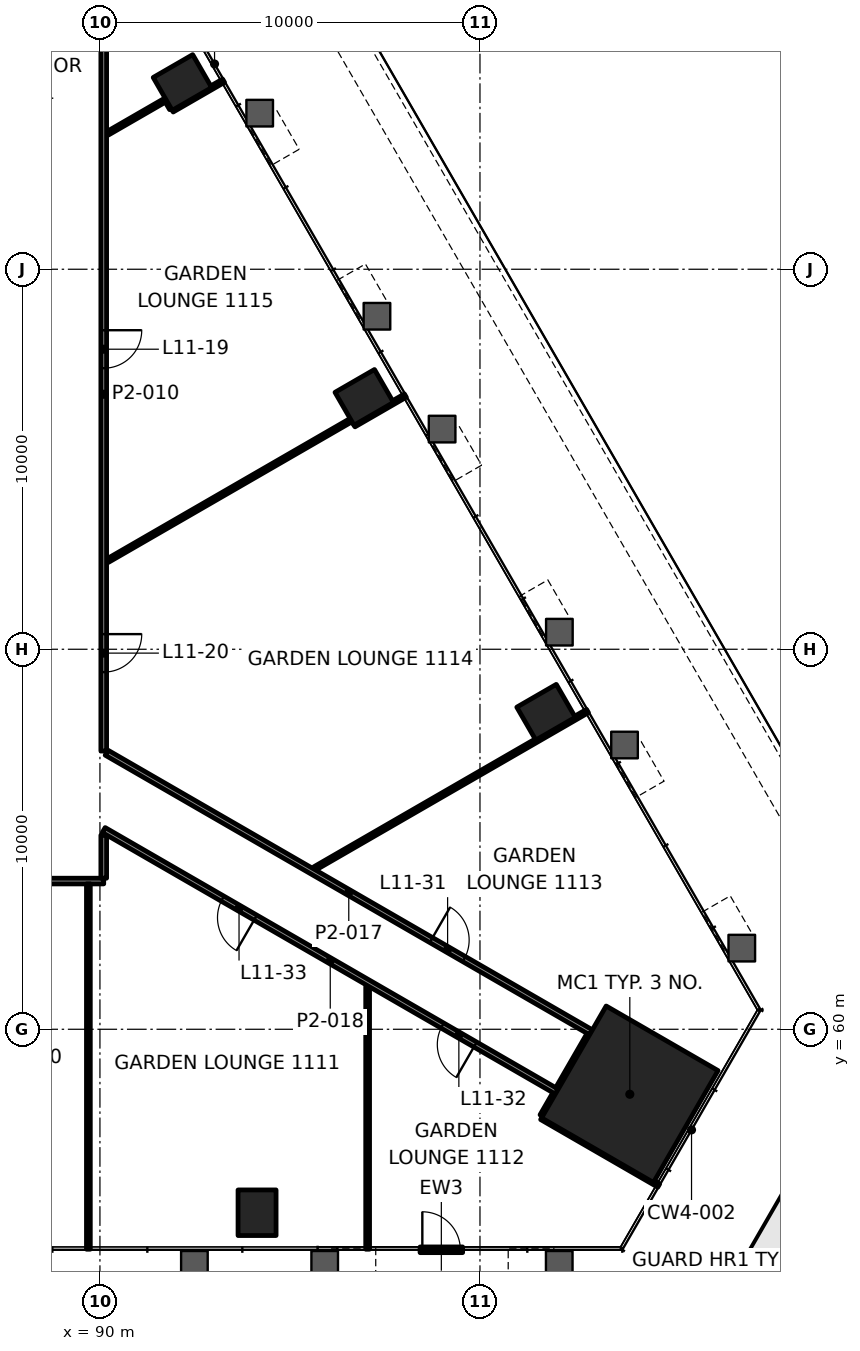
"""IFC4 building model, lengths in metres.
Left out: names, types, materials, properties, quantities, classifications, styles, units other than length and angle.
Written with IfcOpenShell. Run it as: python <this file> out.ifc"""

import sys

from ifc_helpers import new_model, si_unit, direction, frame, frame_2d, origin, origin_2d, place, context, subcontext, project, spatial, rectangle, extrude, element, fill, save


model = new_model("IFC4")
c1 = context("Model", 3, precision=1e-05, world=origin(), true_north=direction((0.0, 1.0)))
c2 = subcontext(c1, "Body", "Model", "MODEL_VIEW")
j1 = project(units=[si_unit("LENGTHUNIT", "METRE"), si_unit("PLANEANGLEUNIT", "RADIAN")], contexts=[c1])
p1 = place(None, origin())
s1 = spatial("IfcSite", under=j1, at=p1, CompositionType="ELEMENT")
p2 = place(p1, origin())
s2 = spatial("IfcBuilding", under=s1, at=p2, CompositionType="ELEMENT")
p3 = place(p2, frame((0.0, 0.0, 52.6)))
s3 = spatial("IfcBuildingStorey", under=s2, at=p3, CompositionType="ELEMENT", Elevation=52.6)
p4 = place(p3, frame((103.943, 58.29, 0.0), z_axis=(0.0, 0.0, 1.0), x_axis=(0.5, 0.866025403784, 0.0)))
e1 = element("IfcColumn", 1, at=p4, inside=s3, PredefinedType="COLUMN", context=c2, shape_type="SweptSolid", body=[
    extrude(rectangle(XDim=3.4, YDim=3.4, at=origin_2d()), origin(), (0.0, 0.0, 1.0), 4.2),
])
for number, where, z_axis, x_axis in (
    (2, (94.135, 55.172, -0.0), (0.0, 0.0, 1.0), (1.0, 0.0, 0.0)),
    (3, (101.739, 68.343, -0.0), (0.0, 0.0, 1.0), (-0.5, 0.866, 0.0)),
    (4, (96.955, 76.628, -0.0), (0.0, 0.0, 1.0), (-0.5, 0.866, 0.0)),
    (5, (92.171, 84.914, -0.0), (0.0, 0.0, 1.0), (-0.5, 0.866, 0.0)),
):
    element("IfcColumn", number, at=place(p3, frame(where, z_axis=z_axis, x_axis=x_axis)), inside=s3, PredefinedType="COLUMN", context=c2, shape_type="SweptSolid", body=[
        extrude(rectangle(XDim=1.0, YDim=1.2, at=origin_2d()), origin(), (0.0, 0.0, 1.0), 4.2),
    ])
p5 = place(p3, frame((90.1, 63.9, 0.0), z_axis=(0.0, 0.0, 1.0), x_axis=(-1.0, 0.0, 0.0)))
e6 = element("IfcWall", 6, at=p5, inside=s3, PredefinedType="PARTITIONING", context=c2, shape_type="SweptSolid", body=[
    extrude(rectangle(XDim=30.2, YDim=0.15, at=frame_2d((15.1, 0.0))), origin(), (0.0, 0.0, 1.0), 3.4),
])
p6 = place(p5, frame((3.578, 0.0, 0.0)))
e7 = element("IfcOpeningElement", 7, at=p6, cuts=e6, PredefinedType="OPENING", context=c2, shape_type="SweptSolid", body=[
    extrude(rectangle(XDim=1.0, YDim=2.1, at=frame_2d((0.5, 1.05))), frame((0.0, 0.085, 0.0), z_axis=(0.0, -1.0, 0.0), x_axis=(1.0, 0.0, 0.0)), (0.0, 0.0, 1.0), 0.17),
])
p7 = place(p5, frame((10.926, 0.0, 0.0)))
e8 = element("IfcOpeningElement", 8, at=p7, cuts=e6, PredefinedType="OPENING", context=c2, shape_type="SweptSolid", body=[
    extrude(rectangle(XDim=1.0, YDim=2.1, at=frame_2d((0.5, 1.05))), frame((0.0, 0.085, 0.0), z_axis=(0.0, -1.0, 0.0), x_axis=(1.0, 0.0, 0.0)), (0.0, 0.0, 1.0), 0.17),
])
p8 = place(p5, frame((22.048, 0.0, 0.0)))
e9 = element("IfcOpeningElement", 9, at=p8, cuts=e6, PredefinedType="OPENING", context=c2, shape_type="SweptSolid", body=[
    extrude(rectangle(XDim=1.0, YDim=2.1, at=frame_2d((0.5, 1.05))), frame((0.0, 0.085, 0.0), z_axis=(0.0, -1.0, 0.0), x_axis=(1.0, 0.0, 0.0)), (0.0, 0.0, 1.0), 0.17),
])
p9 = place(p3, frame((95.653, 64.232, 0.0), z_axis=(0.0, 0.0, 1.0), x_axis=(0.866031516549, 0.499989412232, 0.0)))
e10 = element("IfcWall", 10, at=p9, inside=s3, PredefinedType="PARTITIONING", context=c2, shape_type="SweptSolid", body=[
    extrude(rectangle(XDim=8.286, YDim=0.1, at=frame_2d((4.143, 0.0))), origin(), (0.0, 0.0, 1.0), 3.4),
])
p10 = place(p3, frame((96.686, 75.896, 0.0), z_axis=(0.0, 0.0, 1.0), x_axis=(0.866018739521, 0.500011542666, 0.0)))
e11 = element("IfcWall", 11, at=p10, inside=s3, PredefinedType="PARTITIONING", context=c2, shape_type="SweptSolid", body=[
    extrude(rectangle(XDim=1.56, YDim=0.1, at=frame_2d((0.78, 0.0))), origin(), (0.0, 0.0, 1.0), 3.165),
])
p11 = place(p3, frame((90.201, 72.331, 0.0), z_axis=(0.0, 0.0, 1.0), x_axis=(0.866022913937, 0.500004312517, 0.0)))
e12 = element("IfcWall", 12, at=p11, inside=s3, PredefinedType="PARTITIONING", context=c2, shape_type="SweptSolid", body=[
    extrude(rectangle(XDim=7.398, YDim=0.1, at=frame_2d((3.699, 0.0))), origin(), (0.0, 0.0, 1.0), 3.4),
])
p12 = place(p3, frame((91.902, 84.181, 0.0), z_axis=(0.0, 0.0, 1.0), x_axis=(0.866018739521, 0.500011542666, 0.0)))
e13 = element("IfcWall", 13, at=p12, inside=s3, PredefinedType="PARTITIONING", context=c2, shape_type="SweptSolid", body=[
    extrude(rectangle(XDim=1.56, YDim=0.1, at=frame_2d((0.78, 0.0))), origin(), (0.0, 0.0, 1.0), 3.165),
])
p13 = place(p3, frame((90.201, 83.577, 0.0), z_axis=(0.0, 0.0, 1.0), x_axis=(0.866016025414, 0.500016243463, 0.0)))
e14 = element("IfcWall", 14, at=p13, inside=s3, PredefinedType="PARTITIONING", context=c2, shape_type="SweptSolid", body=[
    extrude(rectangle(XDim=1.774, YDim=0.1, at=frame_2d((0.887, 0.0))), origin(), (0.0, 0.0, 1.0), 3.4),
])
p14 = place(p3, frame((101.646, 57.711, 0.0), z_axis=(0.0, 0.0, 1.0), x_axis=(0.499837337514, 0.866119296648, 0.0)))
e15 = element("IfcWall", 15, at=p14, inside=s3, PredefinedType="PARTITIONING", context=c2, shape_type="SweptSolid", body=[
    extrude(rectangle(XDim=0.675, YDim=0.15, at=frame_2d((0.337, 0.0))), origin(), (0.0, 0.0, 1.0), 3.4),
])
p15 = place(p3, frame((97.044, 54.212, 0.0), z_axis=(0.0, 0.0, 1.0), x_axis=(0.0, 1.0, 0.0)))
e16 = element("IfcWall", 16, at=p15, inside=s3, PredefinedType="PARTITIONING", context=c2, shape_type="SweptSolid", body=[
    extrude(rectangle(XDim=6.905, YDim=0.1, at=frame_2d((3.453, 0.0))), origin(), (0.0, 0.0, 1.0), 3.4),
])
p16 = place(p3, frame((90.1, 63.976, 0.0), z_axis=(0.0, 0.0, 1.0), x_axis=(0.0, 1.0, 0.0)))
e17 = element("IfcWall", 17, at=p16, inside=s3, PredefinedType="PARTITIONING", context=c2, shape_type="SweptSolid", body=[
    extrude(rectangle(XDim=1.131, YDim=0.15, at=frame_2d((0.565, 0.0))), origin(), (0.0, 0.0, 1.0), 3.247),
])
p17 = place(p3, frame((90.1, 86.1, 0.0), z_axis=(0.0, 0.0, 1.0), x_axis=(0.0, -1.0, 0.0)))
e18 = element("IfcWall", 18, at=p17, inside=s3, PredefinedType="PARTITIONING", context=c2, shape_type="SweptSolid", body=[
    extrude(rectangle(XDim=18.778, YDim=0.15, at=frame_2d((9.389, 0.0))), origin(), (0.0, 0.0, 1.0), 3.4),
])
p18 = place(p17, frame((7.704, 0.0, 0.0)))
e19 = element("IfcOpeningElement", 19, at=p18, cuts=e18, PredefinedType="OPENING", context=c2, shape_type="SweptSolid", body=[
    extrude(rectangle(XDim=1.0, YDim=2.1, at=frame_2d((0.5, 1.05))), frame((0.0, 0.085, 0.0), z_axis=(0.0, -1.0, 0.0), x_axis=(1.0, 0.0, 0.0)), (0.0, 0.0, 1.0), 0.17),
])
p19 = place(p17, frame((15.701, 0.0, 0.0)))
e20 = element("IfcOpeningElement", 20, at=p19, cuts=e18, PredefinedType="OPENING", context=c2, shape_type="SweptSolid", body=[
    extrude(rectangle(XDim=1.0, YDim=2.1, at=frame_2d((0.5, 1.05))), frame((0.0, 0.085, 0.0), z_axis=(0.0, -1.0, 0.0), x_axis=(1.0, 0.0, 0.0)), (0.0, 0.0, 1.0), 0.17),
])
p20 = place(p3, frame((89.696, 54.212, 0.0), z_axis=(0.0, 0.0, 1.0), x_axis=(0.0, 1.0, 0.0)))
e21 = element("IfcWall", 21, at=p20, inside=s3, PredefinedType="PARTITIONING", context=c2, shape_type="SweptSolid", body=[
    extrude(rectangle(XDim=9.613, YDim=0.1, at=frame_2d((4.806, 0.0))), origin(), (0.0, 0.0, 1.0), 3.165),
])
p21 = place(p3, frame((91.877, 84.225, 0.0), z_axis=(0.0, 0.0, 1.0), x_axis=(-0.500313526201, 0.865844313662, 0.0)))
e22 = element("IfcWall", 22, at=p21, inside=s3, PredefinedType="PARTITIONING", context=c2, shape_type="SweptSolid", body=[
    extrude(rectangle(XDim=0.226, YDim=0.1, at=frame_2d((0.113, 0.0))), origin(), (0.0, 0.0, 1.0), 3.4),
])
p22 = place(p3, frame((90.175, 67.278, 0.0), z_axis=(0.0, 0.0, 1.0), x_axis=(0.866025356753, -0.50000008146, 0.0)))
e23 = element("IfcWall", 23, at=p22, inside=s3, PredefinedType="PARTITIONING", context=c2, shape_type="SweptSolid", body=[
    extrude(rectangle(XDim=14.717, YDim=0.15, at=frame_2d((7.358, 0.0))), origin(), (0.0, 0.0, 1.0), 3.4),
])
p23 = place(p22, frame((9.861, 0.0, 0.0)))
e24 = element("IfcOpeningElement", 24, at=p23, cuts=e23, PredefinedType="OPENING", context=c2, shape_type="SweptSolid", body=[
    extrude(rectangle(XDim=1.0, YDim=2.1, at=frame_2d((0.5, 1.05))), frame((0.0, 0.085, 0.0), z_axis=(0.0, -1.0, 0.0), x_axis=(1.0, 0.0, 0.0)), (0.0, 0.0, 1.0), 0.17),
])
p24 = place(p3, frame((102.021, 58.361, 0.0), z_axis=(0.0, 0.0, 1.0), x_axis=(-0.866027566471, 0.499996254098, 0.0)))
e25 = element("IfcWall", 25, at=p24, inside=s3, PredefinedType="PARTITIONING", context=c2, shape_type="SweptSolid", body=[
    extrude(rectangle(XDim=13.765, YDim=0.15, at=frame_2d((6.882, 0.0))), origin(), (0.0, 0.0, 1.0), 3.247),
])
p25 = place(p24, frame((2.475, 0.0, 0.0)))
e26 = element("IfcOpeningElement", 26, at=p25, cuts=e25, PredefinedType="OPENING", context=c2, shape_type="SweptSolid", body=[
    extrude(rectangle(XDim=1.0, YDim=2.1, at=frame_2d((0.5, 1.05))), frame((0.0, 0.085, 0.0), z_axis=(0.0, -1.0, 0.0), x_axis=(1.0, 0.0, 0.0)), (0.0, 0.0, 1.0), 0.17),
])
p26 = place(p24, frame((9.154, 0.0, 0.0)))
e27 = element("IfcOpeningElement", 27, at=p26, cuts=e25, PredefinedType="OPENING", context=c2, shape_type="SweptSolid", body=[
    extrude(rectangle(XDim=1.0, YDim=2.1, at=frame_2d((0.5, 1.05))), frame((0.0, 0.085, 0.0), z_axis=(0.0, -1.0, 0.0), x_axis=(1.0, 0.0, 0.0)), (0.0, 0.0, 1.0), 0.17),
])
p27 = place(p3, frame((104.704, 55.888, 0.0), z_axis=(0.0, 0.0, 1.0), x_axis=(-0.866014251095, 0.500019316528, 0.0)))
e28 = element("IfcWall", 28, at=p27, inside=s3, PredefinedType="PARTITIONING", context=c2, shape_type="SweptSolid", body=[
    extrude(rectangle(XDim=3.559, YDim=0.1, at=frame_2d((1.78, 0.0))), origin(), (0.0, 0.0, 1.0), 3.4),
])
p28 = place(p3, frame((102.058, 58.426, 0.0), z_axis=(0.0, 0.0, 1.0), x_axis=(0.499991515992, 0.866030301974, 0.0)))
e29 = element("IfcWall", 29, at=p28, inside=s3, PredefinedType="PARTITIONING", context=c2, shape_type="SweptSolid", body=[
    extrude(rectangle(XDim=1.649, YDim=0.15, at=frame_2d((0.825, 0.0))), origin(), (0.0, 0.0, 1.0), 3.247),
])
p29 = place(p3, frame((110.994, 61.012, 0.0), z_axis=(0.0, 0.0, 1.0), x_axis=(-0.500000853759, 0.866024910866, 0.0)))
e30 = element("IfcWall", 30, at=p29, inside=s3, PredefinedType="SOLIDWALL", context=c2, shape_type="SweptSolid", body=[
    extrude(rectangle(XDim=60.222, YDim=0.8, at=frame_2d((30.111, 0.0))), origin(), (0.0, 0.0, 1.0), 0.9),
])
p30 = place(p18, origin())
e31 = element("IfcDoor", 31, at=p30, inside=s3, OperationType="SINGLE_SWING_LEFT", PredefinedType="DOOR", context=c2, shape_type="SweptSolid", body=[
    extrude(rectangle(XDim=1.0, YDim=2.1, at=frame_2d((0.5, 1.05))), frame((0.0, 0.025, 0.0), z_axis=(0.0, -1.0, 0.0), x_axis=(1.0, 0.0, 0.0)), (0.0, 0.0, 1.0), 0.05),
])
fill(e19, e31)
p31 = place(p19, origin())
e32 = element("IfcDoor", 32, at=p31, inside=s3, OperationType="SINGLE_SWING_RIGHT", PredefinedType="DOOR", context=c2, shape_type="SweptSolid", body=[
    extrude(rectangle(XDim=1.0, YDim=2.1, at=frame_2d((0.5, 1.05))), frame((0.0, 0.025, 0.0), z_axis=(0.0, -1.0, 0.0), x_axis=(1.0, 0.0, 0.0)), (0.0, 0.0, 1.0), 0.05),
])
fill(e20, e32)
p32 = place(p23, origin())
e33 = element("IfcDoor", 33, at=p32, inside=s3, OperationType="SINGLE_SWING_LEFT", PredefinedType="DOOR", context=c2, shape_type="SweptSolid", body=[
    extrude(rectangle(XDim=1.0, YDim=2.1, at=frame_2d((0.5, 1.05))), frame((0.0, 0.025, 0.0), z_axis=(0.0, -1.0, 0.0), x_axis=(1.0, 0.0, 0.0)), (0.0, 0.0, 1.0), 0.05),
])
fill(e24, e33)
p33 = place(p25, origin())
e34 = element("IfcDoor", 34, at=p33, inside=s3, OperationType="SINGLE_SWING_LEFT", PredefinedType="DOOR", context=c2, shape_type="SweptSolid", body=[
    extrude(rectangle(XDim=1.0, YDim=2.1, at=frame_2d((0.5, 1.05))), frame((0.0, 0.025, 0.0), z_axis=(0.0, -1.0, 0.0), x_axis=(1.0, 0.0, 0.0)), (0.0, 0.0, 1.0), 0.05),
])
fill(e26, e34)
p34 = place(p26, origin())
e35 = element("IfcDoor", 35, at=p34, inside=s3, OperationType="SINGLE_SWING_RIGHT", PredefinedType="DOOR", context=c2, shape_type="SweptSolid", body=[
    extrude(rectangle(XDim=1.0, YDim=2.1, at=frame_2d((0.5, 1.05))), frame((0.0, 0.025, 0.0), z_axis=(0.0, -1.0, 0.0), x_axis=(1.0, 0.0, 0.0)), (0.0, 0.0, 1.0), 0.05),
])
fill(e27, e35)
p35 = place(p3, frame((98.423, 54.197, 0.0), z_axis=(0.0, 0.0, 1.0), x_axis=(1.0, 0.0, 0.0)))
p36 = place(p35, frame((0.06, 0.0, 0.0)))
p37 = place(p36, origin())
e36 = element("IfcDoor", 36, at=p37, inside=s3, OperationType="SINGLE_SWING_LEFT", PredefinedType="DOOR", context=c2, shape_type="SweptSolid", body=[
    extrude(rectangle(XDim=1.0, YDim=2.1, at=frame_2d((0.5, 1.05))), frame((0.0, 0.025, 0.0), z_axis=(0.0, -1.0, 0.0), x_axis=(1.0, 0.0, 0.0)), (0.0, 0.0, 1.0), 0.05),
])
save(model, sys.argv[1])
